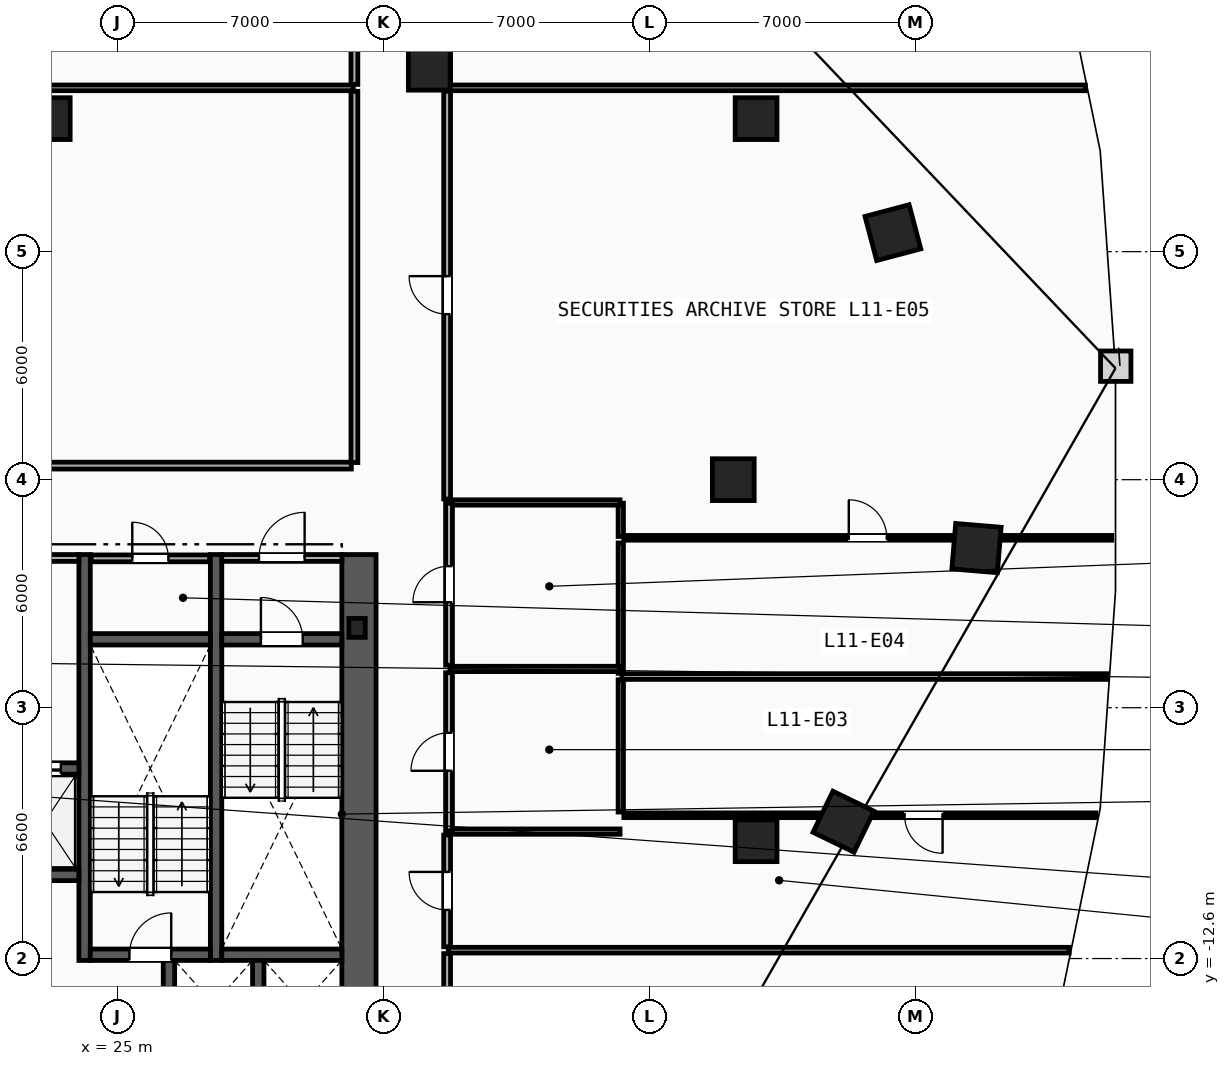
"""IFC4 building model, lengths in metres.
Left out: names, types, materials, properties, quantities, classifications, styles, units other than length and angle.
Written with IfcOpenShell. Run it as: python <this file> out.ifc"""

import sys

from ifc_helpers import new_model, si_unit, direction, frame, frame_2d, origin, origin_2d, place, context, subcontext, project, spatial, rectangle, i_section, extrude, element, fill, save


model = new_model("IFC4")
c1 = context("Model", 3, precision=1e-05, world=origin(), true_north=direction((0.0, 1.0)))
c2 = subcontext(c1, "Body", "Model", "MODEL_VIEW")
j1 = project(units=[si_unit("LENGTHUNIT", "METRE"), si_unit("PLANEANGLEUNIT", "RADIAN")], contexts=[c1])
p1 = place(None, origin())
s1 = spatial("IfcSite", under=j1, at=p1, CompositionType="ELEMENT")
p2 = place(p1, origin())
s2 = spatial("IfcBuilding", under=s1, at=p2, CompositionType="ELEMENT")
p3 = place(p2, frame((0.0, 0.0, 46.8)))
s3 = spatial("IfcBuildingStorey", under=s2, at=p3, CompositionType="ELEMENT", Elevation=46.8)
p4 = place(p3, frame((31.3, -3.9, 0.0), z_axis=(0.0, 0.0, 1.0), x_axis=(1.0, 0.0, 0.0)))
e1 = element("IfcColumn", 1, at=p4, inside=s3, PredefinedType="COLUMN", context=c2, shape_type="SweptSolid", body=[
    extrude(i_section(OverallWidth=0.432, OverallDepth=0.498, WebThickness=0.056, FlangeThickness=0.089, FilletRadius=0.018, at=origin_2d()), origin(), (0.0, 0.0, 1.0), 3.8),
])
for number, where, z_axis, x_axis in (
    (2, (41.2, 0.0, 0.0), (0.0, 0.0, 1.0), (1.0, 0.0, 0.0)),
    (3, (41.8, -9.5, 0.0), (0.0, 0.0, 1.0), (1.0, 0.0, 0.0)),
    (4, (41.8, 9.5, 0.0), (0.0, 0.0, 1.0), (1.0, 0.0, 0.0)),
    (5, (33.2, 10.8, 0.0), (0.0, 0.0, 1.0), (1.0, 0.0, 0.0)),
    (6, (23.2, 9.5, 0.0), (0.0, 0.0, 1.0), (1.0, 0.0, 0.0)),
):
    element("IfcColumn", number, at=place(p3, frame(where, z_axis=z_axis, x_axis=x_axis)), inside=s3, PredefinedType="COLUMN", context=c2, shape_type="SweptSolid", body=[
        extrude(rectangle(XDim=1.1, YDim=1.1, at=origin_2d()), origin(), (0.0, 0.0, 1.0), 3.8),
    ])
for number, where, z_axis, x_axis in (
    (7, (44.1, -9.0, 0.0), (0.0, 0.0, 1.0), (0.437, 0.899, 0.0)),
    (8, (47.6, -1.8, 0.0), (0.0, 0.0, 1.0), (0.084, 0.997, 0.0)),
    (9, (45.4, 6.5, 0.0), (0.0, 0.0, 1.0), (-0.256, 0.967, 0.0)),
):
    element("IfcColumn", number, at=place(p3, frame(where, z_axis=z_axis, x_axis=x_axis)), inside=s3, PredefinedType="COLUMN", context=c2, shape_type="SweptSolid", body=[
        extrude(rectangle(XDim=1.2, YDim=1.2, at=origin_2d()), origin(), (0.0, 0.0, 1.0), 3.8),
    ])
p5 = place(p3, frame((31.35, -15.3, 0.0), z_axis=(0.0, 0.0, 1.0), x_axis=(0.0, 1.0, 0.0)))
e10 = element("IfcWall", 10, at=p5, inside=s3, PredefinedType="SHEAR", context=c2, shape_type="SweptSolid", body=[
    extrude(rectangle(XDim=13.33, YDim=0.9, at=frame_2d((6.665, 0.0))), origin(), (0.0, 0.0, 1.0), 3.5),
])
for number, where, z_axis, x_axis in (
    (11, (27.59, -12.65, 0.0), (0.0, 0.0, 1.0), (0.0, 1.0, 0.0)),
    (12, (24.13, -12.65, 0.0), (0.0, 0.0, 1.0), (0.0, 1.0, 0.0)),
):
    element("IfcWall", number, at=place(p3, frame(where, z_axis=z_axis, x_axis=x_axis)), inside=s3, PredefinedType="SHEAR", context=c2, shape_type="SweptSolid", body=[
        extrude(rectangle(XDim=10.68, YDim=0.3, at=frame_2d((5.34, 0.0))), origin(), (0.0, 0.0, 1.0), 3.5),
    ])
p6 = place(p3, frame((27.74, -4.2, 0.0), z_axis=(0.0, 0.0, 1.0), x_axis=(1.0, 0.0, 0.0)))
e13 = element("IfcWall", 13, at=p6, inside=s3, PredefinedType="SHEAR", context=c2, shape_type="SweptSolid", body=[
    extrude(rectangle(XDim=3.16, YDim=0.3, at=frame_2d((1.58, 0.0))), origin(), (0.0, 0.0, 1.0), 3.5),
])
p7 = place(p6, frame((1.03, 0.0, 0.0)))
e14 = element("IfcOpeningElement", 14, at=p7, cuts=e13, PredefinedType="OPENING", context=c2, shape_type="SweptSolid", body=[
    extrude(rectangle(XDim=1.1, YDim=2.15, at=frame_2d((0.55, 1.075))), frame((0.0, 0.16, 0.0), z_axis=(0.0, -1.0, 0.0), x_axis=(1.0, 0.0, 0.0)), (0.0, 0.0, 1.0), 0.32),
])
p8 = place(p3, frame((27.74, -12.5, 0.0), z_axis=(0.0, 0.0, 1.0), x_axis=(1.0, 0.0, 0.0)))
e15 = element("IfcWall", 15, at=p8, inside=s3, PredefinedType="SHEAR", context=c2, shape_type="SweptSolid", body=[
    extrude(rectangle(XDim=3.16, YDim=0.3, at=frame_2d((1.58, 0.0))), origin(), (0.0, 0.0, 1.0), 3.5),
])
p9 = place(p3, frame((24.28, -12.5, 0.0), z_axis=(0.0, 0.0, 1.0), x_axis=(1.0, 0.0, 0.0)))
e16 = element("IfcWall", 16, at=p9, inside=s3, PredefinedType="SHEAR", context=c2, shape_type="SweptSolid", body=[
    extrude(rectangle(XDim=3.16, YDim=0.3, at=frame_2d((1.58, 0.0))), origin(), (0.0, 0.0, 1.0), 3.5),
])
p10 = place(p9, frame((1.03, 0.0, 0.0)))
e17 = element("IfcOpeningElement", 17, at=p10, cuts=e16, PredefinedType="OPENING", context=c2, shape_type="SweptSolid", body=[
    extrude(rectangle(XDim=1.1, YDim=2.15, at=frame_2d((0.55, 1.075))), frame((0.0, 0.16, 0.0), z_axis=(0.0, -1.0, 0.0), x_axis=(1.0, 0.0, 0.0)), (0.0, 0.0, 1.0), 0.32),
])
p11 = place(p3, frame((24.28, -4.2, 0.0), z_axis=(0.0, 0.0, 1.0), x_axis=(1.0, 0.0, 0.0)))
e18 = element("IfcWall", 18, at=p11, inside=s3, PredefinedType="SHEAR", context=c2, shape_type="SweptSolid", body=[
    extrude(rectangle(XDim=3.16, YDim=0.3, at=frame_2d((1.58, 0.0))), origin(), (0.0, 0.0, 1.0), 3.5),
])
p12 = place(p3, frame((20.98, -2.06, 0.0), z_axis=(0.0, 0.0, 1.0), x_axis=(1.0, 0.0, 0.0)))
e19 = element("IfcWall", 19, at=p12, inside=s3, PredefinedType="PARTITIONING", context=c2, shape_type="SweptSolid", body=[
    extrude(rectangle(XDim=3.0, YDim=0.18, at=frame_2d((1.5, 0.0))), origin(), (0.0, 0.0, 1.0), 3.5),
])
p13 = place(p12, frame((0.9, 0.0, 0.0)))
e20 = element("IfcOpeningElement", 20, at=p13, cuts=e19, PredefinedType="OPENING", context=c2, shape_type="SweptSolid", body=[
    extrude(rectangle(XDim=1.2, YDim=2.15, at=frame_2d((0.6, 1.075))), frame((0.0, 0.1, 0.0), z_axis=(0.0, -1.0, 0.0), x_axis=(1.0, 0.0, 0.0)), (0.0, 0.0, 1.0), 0.2),
])
p14 = place(p3, frame((27.74, -2.06, 0.0), z_axis=(0.0, 0.0, 1.0), x_axis=(1.0, 0.0, 0.0)))
e21 = element("IfcWall", 21, at=p14, inside=s3, PredefinedType="PARTITIONING", context=c2, shape_type="SweptSolid", body=[
    extrude(rectangle(XDim=3.16, YDim=0.18, at=frame_2d((1.58, 0.0))), origin(), (0.0, 0.0, 1.0), 3.5),
])
p15 = place(p14, frame((0.98, 0.0, 0.0)))
e22 = element("IfcOpeningElement", 22, at=p15, cuts=e21, PredefinedType="OPENING", context=c2, shape_type="SweptSolid", body=[
    extrude(rectangle(XDim=1.2, YDim=2.15, at=frame_2d((0.6, 1.075))), frame((0.0, 0.1, 0.0), z_axis=(0.0, -1.0, 0.0), x_axis=(1.0, 0.0, 0.0)), (0.0, 0.0, 1.0), 0.2),
])
p16 = place(p3, frame((21.88, -7.6, 0.0), z_axis=(0.0, 0.0, 1.0), x_axis=(1.0, 0.0, 0.0)))
e23 = element("IfcWall", 23, at=p16, inside=s3, PredefinedType="SHEAR", context=c2, shape_type="SweptSolid", body=[
    extrude(rectangle(XDim=2.1, YDim=0.3, at=frame_2d((1.05, 0.0))), origin(), (0.0, 0.0, 1.0), 3.5),
])
p17 = place(p16, frame((0.475, 0.0, 0.0)))
e24 = element("IfcOpeningElement", 24, at=p17, cuts=e23, PredefinedType="OPENING", context=c2, shape_type="SweptSolid", body=[
    extrude(rectangle(XDim=1.15, YDim=2.2, at=frame_2d((0.575, 1.1))), frame((0.0, 0.16, 0.0), z_axis=(0.0, -1.0, 0.0), x_axis=(1.0, 0.0, 0.0)), (0.0, 0.0, 1.0), 0.32),
])
p18 = place(p3, frame((21.88, -10.4, 0.0), z_axis=(0.0, 0.0, 1.0), x_axis=(1.0, 0.0, 0.0)))
e25 = element("IfcWall", 25, at=p18, inside=s3, PredefinedType="SHEAR", context=c2, shape_type="SweptSolid", body=[
    extrude(rectangle(XDim=2.1, YDim=0.3, at=frame_2d((1.05, 0.0))), origin(), (0.0, 0.0, 1.0), 3.5),
])
for number, where, z_axis, x_axis in (
    (26, (28.7, -14.95, 0.0), (0.0, 0.0, 1.0), (0.0, 1.0, 0.0)),
    (27, (26.35, -14.95, 0.0), (0.0, 0.0, 1.0), (0.0, 1.0, 0.0)),
):
    element("IfcWall", number, at=place(p3, frame(where, z_axis=z_axis, x_axis=x_axis)), inside=s3, PredefinedType="SHEAR", context=c2, shape_type="SweptSolid", body=[
        extrude(rectangle(XDim=2.3, YDim=0.3, at=frame_2d((1.15, 0.0))), origin(), (0.0, 0.0, 1.0), 3.5),
    ])
p19 = place(p3, frame((24.3, -2.07, 0.0), z_axis=(0.0, 0.0, 1.0), x_axis=(1.0, 0.0, 0.0)))
e28 = element("IfcWall", 28, at=p19, inside=s3, PredefinedType="PARTITIONING", context=c2, shape_type="SweptSolid", body=[
    extrude(rectangle(XDim=3.12, YDim=0.18, at=frame_2d((1.56, 0.0))), origin(), (0.0, 0.0, 1.0), 3.5),
])
p20 = place(p19, frame((1.085, 0.0, 0.0)))
e29 = element("IfcOpeningElement", 29, at=p20, cuts=e28, PredefinedType="OPENING", context=c2, shape_type="SweptSolid", body=[
    extrude(rectangle(XDim=0.95, YDim=2.1, at=frame_2d((0.475, 1.05))), frame((0.0, 0.1, 0.0), z_axis=(0.0, -1.0, 0.0), x_axis=(1.0, 0.0, 0.0)), (0.0, 0.0, 1.0), 0.2),
])
p21 = place(p3, frame((38.24, -8.745, 0.0), z_axis=(0.0, 0.0, 1.0), x_axis=(0.0, 1.0, 0.0)))
e30 = element("IfcWall", 30, at=p21, inside=s3, PredefinedType="PARTITIONING", context=c2, shape_type="SweptSolid", body=[
    extrude(rectangle(XDim=3.48, YDim=0.14, at=frame_2d((1.74, 0.0))), origin(), (0.0, 0.0, 1.0), 3.5),
])
p22 = place(p3, frame((38.24, -5.095, 0.0), z_axis=(0.0, 0.0, 1.0), x_axis=(0.0, 1.0, 0.0)))
e31 = element("IfcWall", 31, at=p22, inside=s3, PredefinedType="PARTITIONING", context=c2, shape_type="SweptSolid", body=[
    extrude(rectangle(XDim=3.43, YDim=0.14, at=frame_2d((1.715, 0.0))), origin(), (0.0, 0.0, 1.0), 3.5),
])
p23 = place(p3, frame((38.24, -1.495, 0.0), z_axis=(0.0, 0.0, 1.0), x_axis=(0.0, 1.0, 0.0)))
e32 = element("IfcWall", 32, at=p23, inside=s3, PredefinedType="PARTITIONING", context=c2, shape_type="SweptSolid", body=[
    extrude(rectangle(XDim=0.875, YDim=0.14, at=frame_2d((0.438, 0.0))), origin(), (0.0, 0.0, 1.0), 3.5),
])
for number, where, z_axis, x_axis in (
    (33, (33.74, -0.6, 0.0), (0.0, 0.0, 1.0), (1.0, 0.0, 0.0)),
    (34, (33.74, -4.98, 0.0), (0.0, 0.0, 1.0), (1.0, 0.0, 0.0)),
    (35, (33.74, -9.26, 0.0), (0.0, 0.0, 1.0), (1.0, 0.0, 0.0)),
):
    element("IfcWall", number, at=place(p3, frame(where, z_axis=z_axis, x_axis=x_axis)), inside=s3, PredefinedType="PARTITIONING", context=c2, shape_type="SweptSolid", body=[
        extrude(rectangle(XDim=4.48, YDim=0.14, at=frame_2d((2.24, 0.0))), origin(), (0.0, 0.0, 1.0), 3.5),
    ])
p24 = place(p3, frame((33.72, -4.88, 0.0), z_axis=(0.0, 0.0, 1.0), x_axis=(0.0, 1.0, 0.0)))
e36 = element("IfcWall", 36, at=p24, inside=s3, PredefinedType="PARTITIONING", context=c2, shape_type="SweptSolid", body=[
    extrude(rectangle(XDim=4.26, YDim=0.18, at=frame_2d((2.13, 0.0))), origin(), (0.0, 0.0, 1.0), 3.5),
])
p25 = place(p24, frame((1.655, 0.0, 0.0)))
e37 = element("IfcOpeningElement", 37, at=p25, cuts=e36, PredefinedType="OPENING", context=c2, shape_type="SweptSolid", body=[
    extrude(rectangle(XDim=0.95, YDim=2.1, at=frame_2d((0.475, 1.05))), frame((0.0, 0.1, 0.0), z_axis=(0.0, -1.0, 0.0), x_axis=(1.0, 0.0, 0.0)), (0.0, 0.0, 1.0), 0.2),
])
p26 = place(p3, frame((33.72, -9.24, 0.0), z_axis=(0.0, 0.0, 1.0), x_axis=(0.0, 1.0, 0.0)))
e38 = element("IfcWall", 38, at=p26, inside=s3, PredefinedType="PARTITIONING", context=c2, shape_type="SweptSolid", body=[
    extrude(rectangle(XDim=4.16, YDim=0.18, at=frame_2d((2.08, 0.0))), origin(), (0.0, 0.0, 1.0), 3.5),
])
p27 = place(p26, frame((1.58, 0.0, 0.0)))
e39 = element("IfcOpeningElement", 39, at=p27, cuts=e38, PredefinedType="OPENING", context=c2, shape_type="SweptSolid", body=[
    extrude(rectangle(XDim=1.0, YDim=2.15, at=frame_2d((0.5, 1.075))), frame((0.0, 0.1, 0.0), z_axis=(0.0, -1.0, 0.0), x_axis=(1.0, 0.0, 0.0)), (0.0, 0.0, 1.0), 0.2),
])
p28 = place(p3, frame((13.536, 10.31, 0.0), z_axis=(0.0, 0.0, 1.0), x_axis=(1.0, 0.0, 0.0)))
e40 = element("IfcWall", 40, at=p28, inside=s3, PredefinedType="PARTITIONING", context=c2, shape_type="SweptSolid", body=[
    extrude(rectangle(XDim=17.664, YDim=0.15, at=frame_2d((8.832, 0.0))), origin(), (0.0, 0.0, 1.0), 2.805),
])
p29 = place(p3, frame((33.7, 10.31, 0.0), z_axis=(0.0, 0.0, 1.0), x_axis=(1.0, 0.0, 0.0)))
e41 = element("IfcWall", 41, at=p29, inside=s3, PredefinedType="PARTITIONING", context=c2, shape_type="SweptSolid", body=[
    extrude(rectangle(XDim=16.764, YDim=0.15, at=frame_2d((8.382, 0.0))), origin(), (0.0, 0.0, 1.0), 2.805),
])
p30 = place(p3, frame((38.27, -5.18, 0.0), z_axis=(0.0, 0.0, 1.0), x_axis=(1.0, 0.0, 0.0)))
e42 = element("IfcWall", 42, at=p30, inside=s3, PredefinedType="PARTITIONING", context=c2, shape_type="SweptSolid", body=[
    extrude(rectangle(XDim=12.78, YDim=0.15, at=frame_2d((6.39, 0.0))), origin(), (0.0, 0.0, 1.0), 3.5),
])
p31 = place(p3, frame((33.7, -12.38, 0.0), z_axis=(0.0, 0.0, 1.0), x_axis=(1.0, 0.0, 0.0)))
e43 = element("IfcWall", 43, at=p31, inside=s3, PredefinedType="PARTITIONING", context=c2, shape_type="SweptSolid", body=[
    extrude(rectangle(XDim=16.338, YDim=0.15, at=frame_2d((8.169, 0.0))), origin(), (0.0, 0.0, 1.0), 3.5),
])
p32 = place(p3, frame((33.67, -12.29, 0.0), z_axis=(0.0, 0.0, 1.0), x_axis=(0.0, 1.0, 0.0)))
e44 = element("IfcWall", 44, at=p32, inside=s3, PredefinedType="PARTITIONING", context=c2, shape_type="SweptSolid", body=[
    extrude(rectangle(XDim=2.939, YDim=0.18, at=frame_2d((1.469, 0.0))), origin(), (0.0, 0.0, 1.0), 3.5),
])
p33 = place(p32, frame((0.969, 0.0, 0.0)))
e45 = element("IfcOpeningElement", 45, at=p33, cuts=e44, PredefinedType="OPENING", context=c2, shape_type="SweptSolid", body=[
    extrude(rectangle(XDim=1.0, YDim=2.15, at=frame_2d((0.5, 1.075))), frame((0.0, 0.1, 0.0), z_axis=(0.0, -1.0, 0.0), x_axis=(1.0, 0.0, 0.0)), (0.0, 0.0, 1.0), 0.2),
])
p34 = place(p3, frame((31.15, 0.37, 0.0), z_axis=(0.0, 0.0, 1.0), x_axis=(-1.0, 0.0, 0.0)))
e46 = element("IfcWall", 46, at=p34, inside=s3, PredefinedType="PARTITIONING", context=c2, shape_type="SweptSolid", body=[
    extrude(rectangle(XDim=14.328, YDim=0.18, at=frame_2d((7.164, 0.0))), origin(), (0.0, 0.0, 1.0), 3.5),
])
p35 = place(p3, frame((31.23, 10.22, 0.0), z_axis=(0.0, 0.0, 1.0), x_axis=(0.0, -1.0, 0.0)))
e47 = element("IfcWall", 47, at=p35, inside=s3, PredefinedType="PARTITIONING", context=c2, shape_type="SweptSolid", body=[
    extrude(rectangle(XDim=9.77, YDim=0.18, at=frame_2d((4.885, 0.0))), origin(), (0.0, 0.0, 1.0), 3.5),
])
p36 = place(p3, frame((33.67, -17.428, 0.0), z_axis=(0.0, 0.0, 1.0), x_axis=(0.0, 1.0, 0.0)))
e48 = element("IfcWall", 48, at=p36, inside=s3, PredefinedType="PARTITIONING", context=c2, shape_type="SweptSolid", body=[
    extrude(rectangle(XDim=4.958, YDim=0.18, at=frame_2d((2.479, 0.0))), origin(), (0.0, 0.0, 1.0), 3.5),
])
p37 = place(p3, frame((33.67, -0.509, 0.0), z_axis=(0.0, 0.0, 1.0), x_axis=(0.0, 1.0, 0.0)))
e49 = element("IfcWall", 49, at=p37, inside=s3, PredefinedType="PARTITIONING", context=c2, shape_type="SweptSolid", body=[
    extrude(rectangle(XDim=10.729, YDim=0.18, at=frame_2d((5.364, 0.0))), origin(), (0.0, 0.0, 1.0), 3.5),
])
p38 = place(p37, frame((4.864, 0.0, 0.0)))
e50 = element("IfcOpeningElement", 50, at=p38, cuts=e49, PredefinedType="OPENING", context=c2, shape_type="SweptSolid", body=[
    extrude(rectangle(XDim=1.0, YDim=2.15, at=frame_2d((0.5, 1.075))), frame((0.0, 0.1, 0.0), z_axis=(0.0, -1.0, 0.0), x_axis=(1.0, 0.0, 0.0)), (0.0, 0.0, 1.0), 0.2),
])
for number, where, z_axis, x_axis in (
    (51, (33.67, 10.4, 0.0), (0.0, 0.0, 1.0), (0.0, 1.0, 0.0)),
    (52, (31.23, 11.4, 0.0), (0.0, 0.0, 1.0), (0.0, -1.0, 0.0)),
):
    element("IfcWall", number, at=place(p3, frame(where, z_axis=z_axis, x_axis=x_axis)), inside=s3, PredefinedType="PARTITIONING", context=c2, shape_type="SweptSolid", body=[
        extrude(rectangle(XDim=1.0, YDim=0.18, at=frame_2d((0.5, 0.0))), origin(), (0.0, 0.0, 1.0), 3.5),
    ])
p39 = place(p3, frame((50.742, -8.83, 0.0), z_axis=(0.0, 0.0, 1.0), x_axis=(-1.0, 0.0, 0.0)))
e53 = element("IfcWall", 53, at=p39, inside=s3, PredefinedType="PARTITIONING", context=c2, shape_type="SweptSolid", body=[
    extrude(rectangle(XDim=12.422, YDim=0.125, at=frame_2d((6.211, 0.0))), origin(), (0.0, 0.0, 1.0), 3.5),
])
p40 = place(p39, frame((4.034, 0.0, 0.0)))
e54 = element("IfcOpeningElement", 54, at=p40, cuts=e53, PredefinedType="OPENING", context=c2, shape_type="SweptSolid", body=[
    extrude(rectangle(XDim=1.0, YDim=2.15, at=frame_2d((0.5, 1.075))), frame((0.0, 0.073, 0.0), z_axis=(0.0, -1.0, 0.0), x_axis=(1.0, 0.0, 0.0)), (0.0, 0.0, 1.0), 0.145),
])
p41 = place(p3, frame((38.32, -1.53, 0.0), z_axis=(0.0, 0.0, 1.0), x_axis=(1.0, 0.0, 0.0)))
e55 = element("IfcWall", 55, at=p41, inside=s3, PredefinedType="PARTITIONING", context=c2, shape_type="SweptSolid", body=[
    extrude(rectangle(XDim=12.838, YDim=0.125, at=frame_2d((6.419, 0.0))), origin(), (0.0, 0.0, 1.0), 2.967),
])
p42 = place(p41, frame((5.919, 0.0, 0.0)))
e56 = element("IfcOpeningElement", 56, at=p42, cuts=e55, PredefinedType="OPENING", context=c2, shape_type="SweptSolid", body=[
    extrude(rectangle(XDim=1.0, YDim=2.15, at=frame_2d((0.5, 1.075))), frame((0.0, 0.073, 0.0), z_axis=(0.0, -1.0, 0.0), x_axis=(1.0, 0.0, 0.0)), (0.0, 0.0, 1.0), 0.145),
])
p43 = place(p7, origin())
e57 = element("IfcDoor", 57, at=p43, inside=s3, OperationType="SINGLE_SWING_LEFT", PredefinedType="DOOR", context=c2, shape_type="SweptSolid", body=[
    extrude(rectangle(XDim=1.1, YDim=2.15, at=frame_2d((0.55, 1.075))), frame((0.0, 0.025, 0.0), z_axis=(0.0, -1.0, 0.0), x_axis=(1.0, 0.0, 0.0)), (0.0, 0.0, 1.0), 0.05),
])
fill(e14, e57)
p44 = place(p10, origin())
e58 = element("IfcDoor", 58, at=p44, inside=s3, OperationType="SINGLE_SWING_RIGHT", PredefinedType="DOOR", context=c2, shape_type="SweptSolid", body=[
    extrude(rectangle(XDim=1.1, YDim=2.15, at=frame_2d((0.55, 1.075))), frame((0.0, 0.025, 0.0), z_axis=(0.0, -1.0, 0.0), x_axis=(1.0, 0.0, 0.0)), (0.0, 0.0, 1.0), 0.05),
])
fill(e17, e58)
p45 = place(p15, origin())
e59 = element("IfcDoor", 59, at=p45, inside=s3, OperationType="SINGLE_SWING_RIGHT", PredefinedType="DOOR", context=c2, shape_type="SweptSolid", body=[
    extrude(rectangle(XDim=1.2, YDim=2.15, at=frame_2d((0.6, 1.075))), frame((0.0, 0.025, 0.0), z_axis=(0.0, -1.0, 0.0), x_axis=(1.0, 0.0, 0.0)), (0.0, 0.0, 1.0), 0.05),
])
fill(e22, e59)
p46 = place(p17, origin())
e60 = element("IfcDoor", 60, at=p46, inside=s3, OperationType="SLIDING_TO_LEFT", PredefinedType="TRAPDOOR", context=c2, shape_type="SweptSolid", body=[
    extrude(rectangle(XDim=1.15, YDim=2.2, at=frame_2d((0.575, 1.1))), frame((0.0, 0.025, 0.0), z_axis=(0.0, -1.0, 0.0), x_axis=(1.0, 0.0, 0.0)), (0.0, 0.0, 1.0), 0.05),
])
fill(e24, e60)
p47 = place(p42, origin())
e61 = element("IfcDoor", 61, at=p47, inside=s3, OperationType="SINGLE_SWING_LEFT", PredefinedType="DOOR", context=c2, shape_type="SweptSolid", body=[
    extrude(rectangle(XDim=1.0, YDim=2.15, at=frame_2d((0.5, 1.075))), frame((0.0, 0.025, 0.0), z_axis=(0.0, -1.0, 0.0), x_axis=(1.0, 0.0, 0.0)), (0.0, 0.0, 1.0), 0.05),
])
fill(e56, e61)
p48 = place(p40, origin())
e62 = element("IfcDoor", 62, at=p48, inside=s3, OperationType="SINGLE_SWING_LEFT", PredefinedType="DOOR", context=c2, shape_type="SweptSolid", body=[
    extrude(rectangle(XDim=1.0, YDim=2.15, at=frame_2d((0.5, 1.075))), frame((0.0, 0.025, 0.0), z_axis=(0.0, -1.0, 0.0), x_axis=(1.0, 0.0, 0.0)), (0.0, 0.0, 1.0), 0.05),
])
fill(e54, e62)
p49 = place(p38, origin())
e63 = element("IfcDoor", 63, at=p49, inside=s3, OperationType="SINGLE_SWING_RIGHT", PredefinedType="DOOR", context=c2, shape_type="SweptSolid", body=[
    extrude(rectangle(XDim=1.0, YDim=2.15, at=frame_2d((0.5, 1.075))), frame((0.0, 0.025, 0.0), z_axis=(0.0, -1.0, 0.0), x_axis=(1.0, 0.0, 0.0)), (0.0, 0.0, 1.0), 0.05),
])
fill(e50, e63)
p50 = place(p25, origin())
e64 = element("IfcDoor", 64, at=p50, inside=s3, OperationType="SINGLE_SWING_LEFT", PredefinedType="DOOR", context=c2, shape_type="SweptSolid", body=[
    extrude(rectangle(XDim=0.95, YDim=2.1, at=frame_2d((0.475, 1.05))), frame((0.0, 0.025, 0.0), z_axis=(0.0, -1.0, 0.0), x_axis=(1.0, 0.0, 0.0)), (0.0, 0.0, 1.0), 0.05),
])
fill(e37, e64)
p51 = place(p27, origin())
e65 = element("IfcDoor", 65, at=p51, inside=s3, OperationType="SINGLE_SWING_LEFT", PredefinedType="DOOR", context=c2, shape_type="SweptSolid", body=[
    extrude(rectangle(XDim=1.0, YDim=2.15, at=frame_2d((0.5, 1.075))), frame((0.0, 0.025, 0.0), z_axis=(0.0, -1.0, 0.0), x_axis=(1.0, 0.0, 0.0)), (0.0, 0.0, 1.0), 0.05),
])
fill(e39, e65)
p52 = place(p20, origin())
e66 = element("IfcDoor", 66, at=p52, inside=s3, OperationType="SINGLE_SWING_LEFT", PredefinedType="DOOR", context=c2, shape_type="SweptSolid", body=[
    extrude(rectangle(XDim=0.95, YDim=2.1, at=frame_2d((0.475, 1.05))), frame((0.0, 0.025, 0.0), z_axis=(0.0, -1.0, 0.0), x_axis=(1.0, 0.0, 0.0)), (0.0, 0.0, 1.0), 0.05),
])
fill(e29, e66)
p53 = place(p33, origin())
e67 = element("IfcDoor", 67, at=p53, inside=s3, OperationType="SINGLE_SWING_RIGHT", PredefinedType="DOOR", context=c2, shape_type="SweptSolid", body=[
    extrude(rectangle(XDim=1.0, YDim=2.15, at=frame_2d((0.5, 1.075))), frame((0.0, 0.025, 0.0), z_axis=(0.0, -1.0, 0.0), x_axis=(1.0, 0.0, 0.0)), (0.0, 0.0, 1.0), 0.05),
])
fill(e45, e67)
save(model, sys.argv[1])
